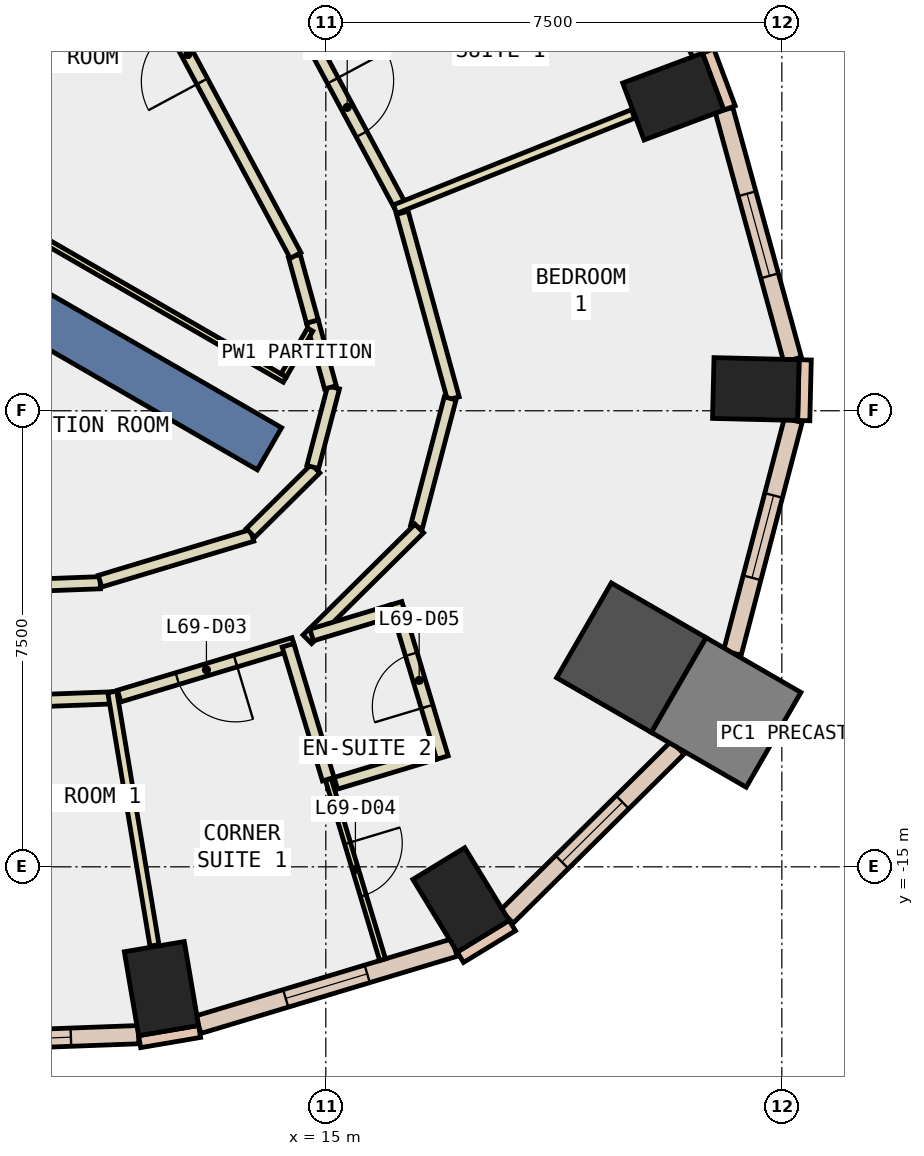
"""IFC4 building model, lengths in metres.
Left out: names, types, materials, properties, quantities, classifications, styles, units other than length and angle.
Written with IfcOpenShell. Run it as: python <this file> out.ifc"""

import sys

from ifc_helpers import new_model, si_unit, direction, frame, frame_2d, origin, origin_2d, place, context, subcontext, project, spatial, rectangle, extrude, element, fill, save


model = new_model("IFC4")
c1 = context("Model", 3, precision=1e-05, world=origin(), true_north=direction((0.0, 1.0)))
c2 = subcontext(c1, "Body", "Model", "MODEL_VIEW")
j1 = project(units=[si_unit("LENGTHUNIT", "METRE"), si_unit("PLANEANGLEUNIT", "RADIAN")], contexts=[c1])
p1 = place(None, origin())
s1 = spatial("IfcSite", under=j1, at=p1, CompositionType="ELEMENT")
p2 = place(p1, origin())
s2 = spatial("IfcBuilding", under=s1, at=p2, CompositionType="ELEMENT")
p3 = place(p2, frame((0.0, 0.0, 297.2)))
s3 = spatial("IfcBuildingStorey", under=s2, at=p3, CompositionType="ELEMENT", Elevation=297.2)
for number, where, z_axis, x_axis in (
    (1, (12.297, -17.003, -0.34), (0.0, 0.0, 1.0), (0.986, 0.168, 0.0)),
    (2, (17.223, -15.544, -0.34), (0.0, 0.0, 1.0), (0.854, 0.521, 0.0)),
):
    element("IfcColumn", number, at=place(p3, frame(where, z_axis=z_axis, x_axis=x_axis)), inside=s3, PredefinedType="COLUMN", context=c2, shape_type="SweptSolid", body=[
        extrude(rectangle(XDim=1.0, YDim=1.4, at=origin_2d()), origin(), (0.0, 0.0, 1.0), 3.6),
    ])
p4 = place(p3, frame((20.025, -11.561, -0.34), z_axis=(0.0, 0.0, 1.0), x_axis=(-0.866025403784, 0.5, 0.0)))
e3 = element("IfcColumn", 3, at=p4, inside=s3, PredefinedType="COLUMN", context=c2, shape_type="SweptSolid", body=[
    extrude(rectangle(XDim=1.8, YDim=1.8, at=origin_2d()), origin(), (0.0, 0.0, 1.0), 3.6),
])
for number, where, z_axis, x_axis in (
    (4, (22.072, -7.143, -0.34), (0.0, 0.0, 1.0), (0.024, 1.0, 0.0)),
    (5, (20.714, -2.333, -0.34), (0.0, 0.0, 1.0), (-0.351, 0.936, 0.0)),
):
    element("IfcColumn", number, at=place(p3, frame(where, z_axis=z_axis, x_axis=x_axis)), inside=s3, PredefinedType="COLUMN", context=c2, shape_type="SweptSolid", body=[
        extrude(rectangle(XDim=1.0, YDim=1.4, at=origin_2d()), origin(), (0.0, 0.0, 1.0), 3.6),
    ])
p5 = place(p3, frame((21.584, -12.461, -0.34), z_axis=(0.0, 0.0, 1.0), x_axis=(-0.866025403784, 0.5, 0.0)))
e6 = element("IfcColumn", 6, at=p5, inside=s3, PredefinedType="COLUMN", context=c2, shape_type="SweptSolid", body=[
    extrude(rectangle(XDim=1.8, YDim=1.8, at=origin_2d()), origin(), (0.0, 0.0, 1.0), 3.6),
])
p6 = place(p3, frame((6.279, -3.625, -0.34), z_axis=(0.0, 0.0, 1.0), x_axis=(0.866017533419, -0.500013631625, 0.0)))
e7 = element("IfcWall", 7, at=p6, inside=s3, PredefinedType="SHEAR", context=c2, shape_type="SweptSolid", body=[
    extrude(rectangle(XDim=9.0, YDim=0.8, at=frame_2d((4.5, 0.0))), origin(), (0.0, 0.0, 1.0), 3.6),
])
p7 = place(p3, frame((21.639, -2.52, 0.0), z_axis=(0.0, 0.0, 1.0), x_axis=(-0.350962844851, 0.936389385637, 0.0)))
e8 = element("IfcWall", 8, at=p7, inside=s3, PredefinedType="STANDARD", context=c2, shape_type="SweptSolid", body=[
    extrude(rectangle(XDim=1.0, YDim=0.2, at=frame_2d((0.5, 0.0))), origin(), (0.0, 0.0, 1.0), 3.26),
])
p8 = place(p3, frame((11.938, -17.875, 0.0), z_axis=(0.0, 0.0, 1.0), x_axis=(0.985800545746, 0.167920469293, 0.0)))
e9 = element("IfcWall", 9, at=p8, inside=s3, PredefinedType="STANDARD", context=c2, shape_type="SweptSolid", body=[
    extrude(rectangle(XDim=1.0, YDim=0.2, at=frame_2d((0.5, 0.0))), origin(), (0.0, 0.0, 1.0), 3.26),
])
p9 = place(p3, frame((17.213, -16.487, 0.0), z_axis=(0.0, 0.0, 1.0), x_axis=(0.853679739553, 0.520798331677, 0.0)))
e10 = element("IfcWall", 10, at=p9, inside=s3, PredefinedType="STANDARD", context=c2, shape_type="SweptSolid", body=[
    extrude(rectangle(XDim=1.0, YDim=0.2, at=frame_2d((0.5, 0.0))), origin(), (0.0, 0.0, 1.0), 3.26),
])
p10 = place(p3, frame((22.86, -7.662, 0.0), z_axis=(0.0, 0.0, 1.0), x_axis=(0.023942303888, 0.999713341956, 0.0)))
e11 = element("IfcWall", 11, at=p10, inside=s3, PredefinedType="STANDARD", context=c2, shape_type="SweptSolid", body=[
    extrude(rectangle(XDim=0.999, YDim=0.2, at=frame_2d((0.5, 0.0))), origin(), (0.0, 0.0, 1.0), 3.26),
])
p11 = place(p3, frame((8.296, -17.895, 0.0), z_axis=(0.0, 0.0, 1.0), x_axis=(0.999306787149, 0.037228284377, 0.0)))
e12 = element("IfcWall", 12, at=p11, inside=s3, PredefinedType="STANDARD", context=c2, shape_type="SweptSolid", body=[
    extrude(rectangle(XDim=3.626, YDim=0.3, at=frame_2d((1.813, 0.0))), origin(), (0.0, 0.0, 1.0), 3.26),
])
p12 = place(p11, frame((1.113, 0.0, 0.9)))
e13 = element("IfcOpeningElement", 13, at=p12, cuts=e12, PredefinedType="OPENING", context=c2, shape_type="SweptSolid", body=[
    extrude(rectangle(XDim=1.4, YDim=2.0, at=frame_2d((0.7, 1.0))), frame((0.0, 0.16, 0.0), z_axis=(0.0, -1.0, 0.0), x_axis=(1.0, 0.0, 0.0)), (0.0, 0.0, 1.0), 0.32),
])
p13 = place(p3, frame((12.904, -17.596, 0.0), z_axis=(0.0, 0.0, 1.0), x_axis=(0.957563190743, 0.288223412884, 0.0)))
e14 = element("IfcWall", 14, at=p13, inside=s3, PredefinedType="STANDARD", context=c2, shape_type="SweptSolid", body=[
    extrude(rectangle(XDim=4.4, YDim=0.3, at=frame_2d((2.2, 0.0))), origin(), (0.0, 0.0, 1.0), 3.26),
])
p14 = place(p13, frame((1.5, 0.0, 0.9)))
e15 = element("IfcOpeningElement", 15, at=p14, cuts=e14, PredefinedType="OPENING", context=c2, shape_type="SweptSolid", body=[
    extrude(rectangle(XDim=1.4, YDim=2.0, at=frame_2d((0.7, 1.0))), frame((0.0, 0.16, 0.0), z_axis=(0.0, -1.0, 0.0), x_axis=(1.0, 0.0, 0.0)), (0.0, 0.0, 1.0), 0.32),
])
p15 = place(p3, frame((17.976, -15.82, 0.0), z_axis=(0.0, 0.0, 1.0), x_axis=(0.710893699296, 0.703299472701, 0.0)))
e16 = element("IfcWall", 16, at=p15, inside=s3, PredefinedType="STANDARD", context=c2, shape_type="SweptSolid", body=[
    extrude(rectangle(XDim=3.954, YDim=0.3, at=frame_2d((1.977, 0.0))), origin(), (0.0, 0.0, 1.0), 3.26),
])
p16 = place(p15, frame((1.277, 0.0, 0.9)))
e17 = element("IfcOpeningElement", 17, at=p16, cuts=e16, PredefinedType="OPENING", context=c2, shape_type="SweptSolid", body=[
    extrude(rectangle(XDim=1.4, YDim=2.0, at=frame_2d((0.7, 1.0))), frame((0.0, 0.16, 0.0), z_axis=(0.0, -1.0, 0.0), x_axis=(1.0, 0.0, 0.0)), (0.0, 0.0, 1.0), 0.32),
])
p17 = place(p3, frame((21.686, -11.482, 0.0), z_axis=(0.0, 0.0, 1.0), x_axis=(0.253402039956, 0.96736105263, 0.0)))
e18 = element("IfcWall", 18, at=p17, inside=s3, PredefinedType="STANDARD", context=c2, shape_type="SweptSolid", body=[
    extrude(rectangle(XDim=3.954, YDim=0.3, at=frame_2d((1.977, 0.0))), origin(), (0.0, 0.0, 1.0), 3.26),
])
p18 = place(p17, frame((1.277, 0.0, 0.9)))
e19 = element("IfcOpeningElement", 19, at=p18, cuts=e18, PredefinedType="OPENING", context=c2, shape_type="SweptSolid", body=[
    extrude(rectangle(XDim=1.4, YDim=2.0, at=frame_2d((0.7, 1.0))), frame((0.0, 0.16, 0.0), z_axis=(0.0, -1.0, 0.0), x_axis=(1.0, 0.0, 0.0)), (0.0, 0.0, 1.0), 0.32),
])
p19 = place(p3, frame((22.677, -6.659, 0.0), z_axis=(0.0, 0.0, 1.0), x_axis=(-0.264892613927, 0.964277917971, 0.0)))
e20 = element("IfcWall", 20, at=p19, inside=s3, PredefinedType="STANDARD", context=c2, shape_type="SweptSolid", body=[
    extrude(rectangle(XDim=4.258, YDim=0.3, at=frame_2d((2.129, 0.0))), origin(), (0.0, 0.0, 1.0), 3.26),
])
p20 = place(p19, frame((1.429, 0.0, 0.9)))
e21 = element("IfcOpeningElement", 21, at=p20, cuts=e20, PredefinedType="OPENING", context=c2, shape_type="SweptSolid", body=[
    extrude(rectangle(XDim=1.4, YDim=2.0, at=frame_2d((0.7, 1.0))), frame((0.0, 0.16, 0.0), z_axis=(0.0, -1.0, 0.0), x_axis=(1.0, 0.0, 0.0)), (0.0, 0.0, 1.0), 0.32),
])
p21 = place(p3, frame((21.177, -1.626, 0.0), z_axis=(0.0, 0.0, 1.0), x_axis=(-0.473225522632, 0.880941317415, 0.0)))
e22 = element("IfcWall", 22, at=p21, inside=s3, PredefinedType="STANDARD", context=c2, shape_type="SweptSolid", body=[
    extrude(rectangle(XDim=7.345, YDim=0.3, at=frame_2d((3.673, 0.0))), origin(), (0.0, 0.0, 1.0), 3.26),
])
p22 = place(p21, frame((0.736, 0.0, 0.9)))
e23 = element("IfcOpeningElement", 23, at=p22, cuts=e22, PredefinedType="OPENING", context=c2, shape_type="SweptSolid", body=[
    extrude(rectangle(XDim=2.2, YDim=2.0, at=frame_2d((1.1, 1.0))), frame((0.0, 0.16, 0.0), z_axis=(0.0, -1.0, 0.0), x_axis=(1.0, 0.0, 0.0)), (0.0, 0.0, 1.0), 0.32),
])
p23 = place(p21, frame((4.409, 0.0, 0.9)))
e24 = element("IfcOpeningElement", 24, at=p23, cuts=e22, PredefinedType="OPENING", context=c2, shape_type="SweptSolid", body=[
    extrude(rectangle(XDim=2.2, YDim=2.0, at=frame_2d((1.1, 1.0))), frame((0.0, 0.16, 0.0), z_axis=(0.0, -1.0, 0.0), x_axis=(1.0, 0.0, 0.0)), (0.0, 0.0, 1.0), 0.32),
])
p24 = place(p3, frame((7.9, -10.455, 0.0), z_axis=(0.0, 0.0, 1.0), x_axis=(0.999297278907, 0.037482640915, 0.0)))
e25 = element("IfcWall", 25, at=p24, inside=s3, PredefinedType="PARTITIONING", context=c2, shape_type="SweptSolid", body=[
    extrude(rectangle(XDim=3.394, YDim=0.2, at=frame_2d((1.697, 0.0))), origin(), (0.0, 0.0, 1.0), 3.26),
])
p25 = place(p24, frame((1.196, 0.0, 0.0)))
e26 = element("IfcOpeningElement", 26, at=p25, cuts=e25, PredefinedType="OPENING", context=c2, shape_type="SweptSolid", body=[
    extrude(rectangle(XDim=1.0, YDim=2.1, at=frame_2d((0.5, 1.05))), frame((0.0, 0.11, 0.0), z_axis=(0.0, -1.0, 0.0), x_axis=(1.0, 0.0, 0.0)), (0.0, 0.0, 1.0), 0.22),
])
p26 = place(p3, frame((11.286, -10.303, 0.0), z_axis=(0.0, 0.0, 1.0), x_axis=(0.957555754851, 0.288248115955, 0.0)))
e27 = element("IfcWall", 27, at=p26, inside=s3, PredefinedType="PARTITIONING", context=c2, shape_type="SweptSolid", body=[
    extrude(rectangle(XDim=2.612, YDim=0.2, at=frame_2d((1.306, 0.0))), origin(), (0.0, 0.0, 1.0), 3.26),
])
p27 = place(p3, frame((13.762, -9.509, 0.0), z_axis=(0.0, 0.0, 1.0), x_axis=(0.710749293824, 0.703445407497, 0.0)))
e28 = element("IfcWall", 28, at=p27, inside=s3, PredefinedType="PARTITIONING", context=c2, shape_type="SweptSolid", body=[
    extrude(rectangle(XDim=1.504, YDim=0.2, at=frame_2d((0.752, 0.0))), origin(), (0.0, 0.0, 1.0), 3.26),
])
p28 = place(p3, frame((14.785, -8.425, 0.0), z_axis=(0.0, 0.0, 1.0), x_axis=(0.253295121261, 0.967389053869, 0.0)))
e29 = element("IfcWall", 29, at=p28, inside=s3, PredefinedType="PARTITIONING", context=c2, shape_type="SweptSolid", body=[
    extrude(rectangle(XDim=1.354, YDim=0.2, at=frame_2d((0.677, 0.0))), origin(), (0.0, 0.0, 1.0), 3.26),
])
p29 = place(p3, frame((15.076, -7.115, 0.0), z_axis=(0.0, 0.0, 1.0), x_axis=(-0.264368116744, 0.964421846937, 0.0)))
e30 = element("IfcWall", 30, at=p29, inside=s3, PredefinedType="PARTITIONING", context=c2, shape_type="SweptSolid", body=[
    extrude(rectangle(XDim=1.123, YDim=0.2, at=frame_2d((0.562, 0.0))), origin(), (0.0, 0.0, 1.0), 3.26),
])
p30 = place(p3, frame((14.779, -6.032, 0.0), z_axis=(0.0, 0.0, 1.0), x_axis=(-0.265740072272, 0.964044715762, 0.0)))
e31 = element("IfcWall", 31, at=p30, inside=s3, PredefinedType="PARTITIONING", context=c2, shape_type="SweptSolid", body=[
    extrude(rectangle(XDim=1.118, YDim=0.2, at=frame_2d((0.559, 0.0))), origin(), (0.0, 0.0, 1.0), 3.26),
])
p31 = place(p3, frame((14.503, -4.946, 0.0), z_axis=(0.0, 0.0, 1.0), x_axis=(-0.473101362557, 0.881008002658, 0.0)))
e32 = element("IfcWall", 32, at=p31, inside=s3, PredefinedType="PARTITIONING", context=c2, shape_type="SweptSolid", body=[
    extrude(rectangle(XDim=7.497, YDim=0.2, at=frame_2d((3.749, 0.0))), origin(), (0.0, 0.0, 1.0), 3.26),
])
p32 = place(p31, frame((3.249, 0.0, 0.0)))
e33 = element("IfcOpeningElement", 33, at=p32, cuts=e32, PredefinedType="OPENING", context=c2, shape_type="SweptSolid", body=[
    extrude(rectangle(XDim=1.0, YDim=2.1, at=frame_2d((0.5, 1.05))), frame((0.0, 0.11, 0.0), z_axis=(0.0, -1.0, 0.0), x_axis=(1.0, 0.0, 0.0)), (0.0, 0.0, 1.0), 0.22),
])
p33 = place(p3, frame((11.53, -12.22, 0.0), z_axis=(0.0, 0.0, 1.0), x_axis=(-0.999293554816, -0.037581794833, 0.0)))
e34 = element("IfcWall", 34, at=p33, inside=s3, PredefinedType="PARTITIONING", context=c2, shape_type="SweptSolid", body=[
    extrude(rectangle(XDim=3.833, YDim=0.2, at=frame_2d((1.917, 0.0))), origin(), (0.0, 0.0, 1.0), 3.26),
])
p34 = place(p3, frame((14.473, -11.328, 0.0), z_axis=(0.0, 0.0, 1.0), x_axis=(-0.957599689503, -0.288102125406, 0.0)))
e35 = element("IfcWall", 35, at=p34, inside=s3, PredefinedType="PARTITIONING", context=c2, shape_type="SweptSolid", body=[
    extrude(rectangle(XDim=2.999, YDim=0.2, at=frame_2d((1.5, 0.0))), origin(), (0.0, 0.0, 1.0), 3.26),
])
p35 = place(p34, frame((1.0, 0.0, 0.0)))
e36 = element("IfcOpeningElement", 36, at=p35, cuts=e35, PredefinedType="OPENING", context=c2, shape_type="SweptSolid", body=[
    extrude(rectangle(XDim=1.0, YDim=2.1, at=frame_2d((0.5, 1.05))), frame((0.0, 0.11, 0.0), z_axis=(0.0, -1.0, 0.0), x_axis=(1.0, 0.0, 0.0)), (0.0, 0.0, 1.0), 0.22),
])
p36 = place(p3, frame((16.258, -4.244, 0.0), z_axis=(0.0, 0.0, 1.0), x_axis=(0.264930673246, -0.964267462053, 0.0)))
e37 = element("IfcWall", 37, at=p36, inside=s3, PredefinedType="PARTITIONING", context=c2, shape_type="SweptSolid", body=[
    extrude(rectangle(XDim=3.166, YDim=0.2, at=frame_2d((1.583, 0.0))), origin(), (0.0, 0.0, 1.0), 3.26),
])
p37 = place(p3, frame((17.045, -7.297, 0.0), z_axis=(0.0, 0.0, 1.0), x_axis=(-0.253618393349, -0.967304352598, 0.0)))
e38 = element("IfcWall", 38, at=p37, inside=s3, PredefinedType="PARTITIONING", context=c2, shape_type="SweptSolid", body=[
    extrude(rectangle(XDim=2.184, YDim=0.2, at=frame_2d((1.092, 0.0))), origin(), (0.0, 0.0, 1.0), 3.26),
])
p38 = place(p3, frame((16.537, -9.436, 0.0), z_axis=(0.0, 0.0, 1.0), x_axis=(-0.710773151724, -0.703421301063, 0.0)))
e39 = element("IfcWall", 39, at=p38, inside=s3, PredefinedType="PARTITIONING", context=c2, shape_type="SweptSolid", body=[
    extrude(rectangle(XDim=2.59, YDim=0.2, at=frame_2d((1.295, 0.0))), origin(), (0.0, 0.0, 1.0), 3.26),
])
p39 = place(p3, frame((14.461, -0.852, 0.0), z_axis=(0.0, 0.0, 1.0), x_axis=(0.473160180459, -0.88097641491, 0.0)))
e40 = element("IfcWall", 40, at=p39, inside=s3, PredefinedType="PARTITIONING", context=c2, shape_type="SweptSolid", body=[
    extrude(rectangle(XDim=3.766, YDim=0.2, at=frame_2d((1.883, 0.0))), origin(), (0.0, 0.0, 1.0), 3.26),
])
p40 = place(p39, frame((1.383, 0.0, 0.0)))
e41 = element("IfcOpeningElement", 41, at=p40, cuts=e40, PredefinedType="OPENING", context=c2, shape_type="SweptSolid", body=[
    extrude(rectangle(XDim=1.0, YDim=2.1, at=frame_2d((0.5, 1.05))), frame((0.0, 0.11, 0.0), z_axis=(0.0, -1.0, 0.0), x_axis=(1.0, 0.0, 0.0)), (0.0, 0.0, 1.0), 0.22),
])
p41 = place(p3, frame((6.835, -2.662, 0.0), z_axis=(0.0, 0.0, 1.0), x_axis=(0.866023427642, -0.500003422764, 0.0)))
e42 = element("IfcWall", 42, at=p41, inside=s3, PredefinedType="PARTITIONING", context=c2, shape_type="SweptSolid", body=[
    extrude(rectangle(XDim=8.65, YDim=0.1, at=frame_2d((4.325, 0.0))), origin(), (0.0, 0.0, 1.0), 3.26),
])
p42 = place(p3, frame((14.307, -6.919, 0.0), z_axis=(0.0, 0.0, 1.0), x_axis=(0.500305662732, 0.865848857387, 0.0)))
e43 = element("IfcWall", 43, at=p42, inside=s3, PredefinedType="PARTITIONING", context=c2, shape_type="SweptSolid", body=[
    extrude(rectangle(XDim=0.87, YDim=0.1, at=frame_2d((0.435, 0.0))), origin(), (0.0, 0.0, 1.0), 3.26),
])
p43 = place(p3, frame((11.488, -12.123, 0.0), z_axis=(0.0, 0.0, 1.0), x_axis=(0.164174159643, -0.986431368776, 0.0)))
e44 = element("IfcWall", 44, at=p43, inside=s3, PredefinedType="PARTITIONING", context=c2, shape_type="SweptSolid", body=[
    extrude(rectangle(XDim=4.226, YDim=0.15, at=frame_2d((2.113, 0.0))), origin(), (0.0, 0.0, 1.0), 3.26),
])
p44 = place(p3, frame((15.04, -13.559, 0.0), z_axis=(0.0, 0.0, 1.0), x_axis=(0.288337370875, -0.957528882362, 0.0)))
e45 = element("IfcWall", 45, at=p44, inside=s3, PredefinedType="PARTITIONING", context=c2, shape_type="SweptSolid", body=[
    extrude(rectangle(XDim=3.101, YDim=0.1, at=frame_2d((1.55, 0.0))), origin(), (0.0, 0.0, 1.0), 3.26),
])
p45 = place(p44, frame((1.1, 0.0, 0.0)))
e46 = element("IfcOpeningElement", 46, at=p45, cuts=e45, PredefinedType="OPENING", context=c2, shape_type="SweptSolid", body=[
    extrude(rectangle(XDim=0.9, YDim=2.1, at=frame_2d((0.45, 1.05))), frame((0.0, 0.06, 0.0), z_axis=(0.0, -1.0, 0.0), x_axis=(1.0, 0.0, 0.0)), (0.0, 0.0, 1.0), 0.12),
])
p46 = place(p3, frame((14.378, -11.357, 0.0), z_axis=(0.0, 0.0, 1.0), x_axis=(0.287932252498, -0.957650780802, 0.0)))
e47 = element("IfcWall", 47, at=p46, inside=s3, PredefinedType="PARTITIONING", context=c2, shape_type="SweptSolid", body=[
    extrude(rectangle(XDim=2.3, YDim=0.2, at=frame_2d((1.15, 0.0))), origin(), (0.0, 0.0, 1.0), 3.26),
])
p47 = place(p3, frame((15.165, -13.626, 0.0), z_axis=(0.0, 0.0, 1.0), x_axis=(0.957565028189, 0.288217308275, 0.0)))
e48 = element("IfcWall", 48, at=p47, inside=s3, PredefinedType="PARTITIONING", context=c2, shape_type="SweptSolid", body=[
    extrude(rectangle(XDim=1.7, YDim=0.2, at=frame_2d((0.85, 0.0))), origin(), (0.0, 0.0, 1.0), 3.26),
])
p48 = place(p3, frame((16.917, -13.203, 0.0), z_axis=(0.0, 0.0, 1.0), x_axis=(-0.287998855134, 0.957630753183, 0.0)))
e49 = element("IfcWall", 49, at=p48, inside=s3, PredefinedType="PARTITIONING", context=c2, shape_type="SweptSolid", body=[
    extrude(rectangle(XDim=2.649, YDim=0.2, at=frame_2d((1.325, 0.0))), origin(), (0.0, 0.0, 1.0), 3.26),
])
p49 = place(p48, frame((0.875, 0.0, 0.0)))
e50 = element("IfcOpeningElement", 50, at=p49, cuts=e49, PredefinedType="OPENING", context=c2, shape_type="SweptSolid", body=[
    extrude(rectangle(XDim=0.9, YDim=2.1, at=frame_2d((0.45, 1.05))), frame((0.0, 0.11, 0.0), z_axis=(0.0, -1.0, 0.0), x_axis=(1.0, 0.0, 0.0)), (0.0, 0.0, 1.0), 0.22),
])
p50 = place(p3, frame((16.087, -10.79, 0.0), z_axis=(0.0, 0.0, 1.0), x_axis=(-0.957425655367, -0.288679951581, 0.0)))
e51 = element("IfcWall", 51, at=p50, inside=s3, PredefinedType="PARTITIONING", context=c2, shape_type="SweptSolid", body=[
    extrude(rectangle(XDim=1.378, YDim=0.2, at=frame_2d((0.689, 0.0))), origin(), (0.0, 0.0, 1.0), 3.26),
])
p51 = place(p3, frame((16.138, -4.185, 0.0), z_axis=(0.0, 0.0, 1.0), x_axis=(0.928432751736, 0.371500505388, 0.0)))
e52 = element("IfcWall", 52, at=p51, inside=s3, PredefinedType="PARTITIONING", context=c2, shape_type="SweptSolid", body=[
    extrude(rectangle(XDim=4.216, YDim=0.15, at=frame_2d((2.108, 0.0))), origin(), (0.0, 0.0, 1.0), 3.26),
])
p52 = place(p12, origin())
e53 = element("IfcWindow", 53, at=p52, inside=s3, PartitioningType="SINGLE_PANEL", PredefinedType="WINDOW", context=c2, shape_type="SweptSolid", body=[
    extrude(rectangle(XDim=1.4, YDim=2.0, at=frame_2d((0.7, 1.0))), frame((0.0, 0.03, 0.0), z_axis=(0.0, -1.0, 0.0), x_axis=(1.0, 0.0, 0.0)), (0.0, 0.0, 1.0), 0.06),
])
fill(e13, e53)
p53 = place(p14, origin())
e54 = element("IfcWindow", 54, at=p53, inside=s3, PartitioningType="SINGLE_PANEL", PredefinedType="WINDOW", context=c2, shape_type="SweptSolid", body=[
    extrude(rectangle(XDim=1.4, YDim=2.0, at=frame_2d((0.7, 1.0))), frame((0.0, 0.03, 0.0), z_axis=(0.0, -1.0, 0.0), x_axis=(1.0, 0.0, 0.0)), (0.0, 0.0, 1.0), 0.06),
])
fill(e15, e54)
p54 = place(p16, origin())
e55 = element("IfcWindow", 55, at=p54, inside=s3, PartitioningType="SINGLE_PANEL", PredefinedType="WINDOW", context=c2, shape_type="SweptSolid", body=[
    extrude(rectangle(XDim=1.4, YDim=2.0, at=frame_2d((0.7, 1.0))), frame((0.0, 0.03, 0.0), z_axis=(0.0, -1.0, 0.0), x_axis=(1.0, 0.0, 0.0)), (0.0, 0.0, 1.0), 0.06),
])
fill(e17, e55)
p55 = place(p18, origin())
e56 = element("IfcWindow", 56, at=p55, inside=s3, PartitioningType="SINGLE_PANEL", PredefinedType="WINDOW", context=c2, shape_type="SweptSolid", body=[
    extrude(rectangle(XDim=1.4, YDim=2.0, at=frame_2d((0.7, 1.0))), frame((0.0, 0.03, 0.0), z_axis=(0.0, -1.0, 0.0), x_axis=(1.0, 0.0, 0.0)), (0.0, 0.0, 1.0), 0.06),
])
fill(e19, e56)
p56 = place(p20, origin())
e57 = element("IfcWindow", 57, at=p56, inside=s3, PartitioningType="SINGLE_PANEL", PredefinedType="WINDOW", context=c2, shape_type="SweptSolid", body=[
    extrude(rectangle(XDim=1.4, YDim=2.0, at=frame_2d((0.7, 1.0))), frame((0.0, 0.03, 0.0), z_axis=(0.0, -1.0, 0.0), x_axis=(1.0, 0.0, 0.0)), (0.0, 0.0, 1.0), 0.06),
])
fill(e21, e57)
p57 = place(p35, origin())
e58 = element("IfcDoor", 58, at=p57, inside=s3, OperationType="SINGLE_SWING_LEFT", PredefinedType="DOOR", context=c2, shape_type="SweptSolid", body=[
    extrude(rectangle(XDim=1.0, YDim=2.1, at=frame_2d((0.5, 1.05))), frame((0.0, 0.025, 0.0), z_axis=(0.0, -1.0, 0.0), x_axis=(1.0, 0.0, 0.0)), (0.0, 0.0, 1.0), 0.05),
])
fill(e36, e58)
p58 = place(p45, origin())
e59 = element("IfcDoor", 59, at=p58, inside=s3, OperationType="SINGLE_SWING_LEFT", PredefinedType="DOOR", context=c2, shape_type="SweptSolid", body=[
    extrude(rectangle(XDim=0.9, YDim=2.1, at=frame_2d((0.45, 1.05))), frame((0.0, 0.025, 0.0), z_axis=(0.0, -1.0, 0.0), x_axis=(1.0, 0.0, 0.0)), (0.0, 0.0, 1.0), 0.05),
])
fill(e46, e59)
p59 = place(p49, origin())
e60 = element("IfcDoor", 60, at=p59, inside=s3, OperationType="SINGLE_SWING_LEFT", PredefinedType="DOOR", context=c2, shape_type="SweptSolid", body=[
    extrude(rectangle(XDim=0.9, YDim=2.1, at=frame_2d((0.45, 1.05))), frame((0.0, 0.025, 0.0), z_axis=(0.0, -1.0, 0.0), x_axis=(1.0, 0.0, 0.0)), (0.0, 0.0, 1.0), 0.05),
])
fill(e50, e60)
p60 = place(p40, origin())
e61 = element("IfcDoor", 61, at=p60, inside=s3, OperationType="SINGLE_SWING_LEFT", PredefinedType="DOOR", context=c2, shape_type="SweptSolid", body=[
    extrude(rectangle(XDim=1.0, YDim=2.1, at=frame_2d((0.5, 1.05))), frame((0.0, 0.025, 0.0), z_axis=(0.0, -1.0, 0.0), x_axis=(1.0, 0.0, 0.0)), (0.0, 0.0, 1.0), 0.05),
])
fill(e41, e61)
p61 = place(p32, origin())
e62 = element("IfcDoor", 62, at=p61, inside=s3, OperationType="SINGLE_SWING_LEFT", PredefinedType="DOOR", context=c2, shape_type="SweptSolid", body=[
    extrude(rectangle(XDim=1.0, YDim=2.1, at=frame_2d((0.5, 1.05))), frame((0.0, 0.025, 0.0), z_axis=(0.0, -1.0, 0.0), x_axis=(1.0, 0.0, 0.0)), (0.0, 0.0, 1.0), 0.05),
])
fill(e33, e62)
save(model, sys.argv[1])
